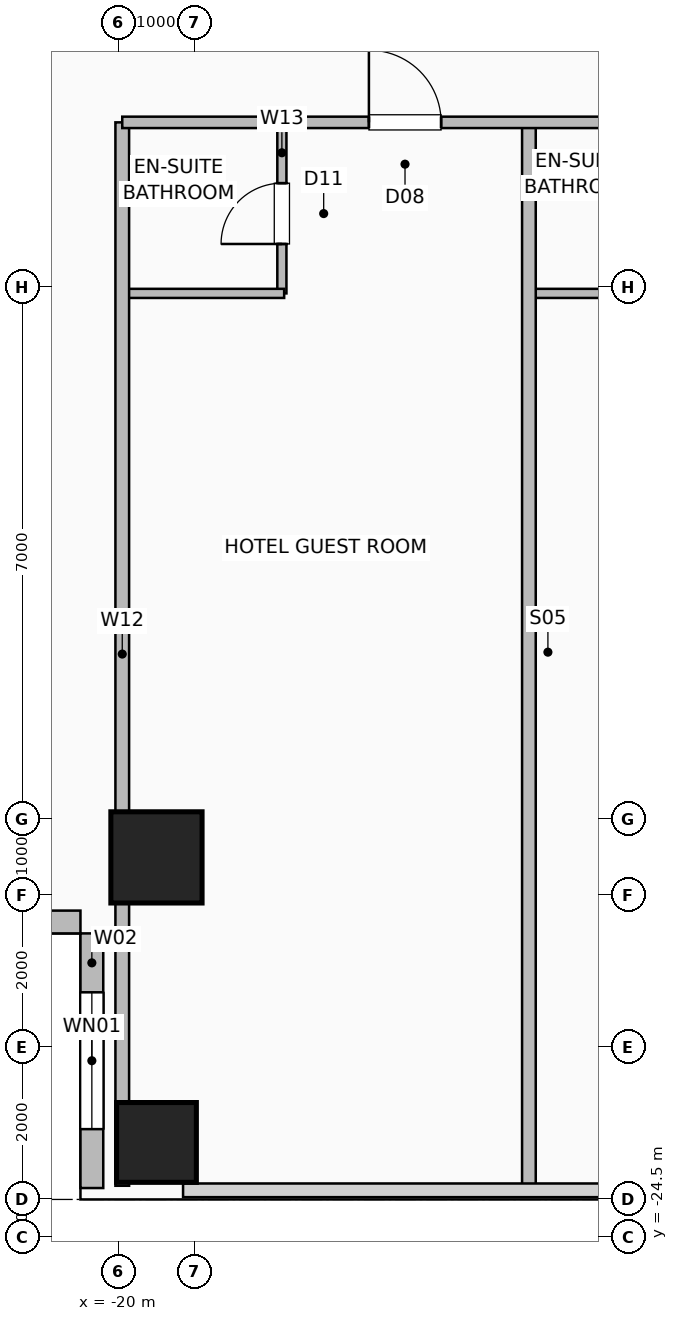
"""IFC4 building model, lengths in metres.
Left out: names, types, materials, properties, quantities, classifications, styles, units other than length and angle.
Written with IfcOpenShell. Run it as: python <this file> out.ifc"""

import sys

from ifc_helpers import new_model, si_unit, direction, frame, frame_2d, origin, origin_2d, place, context, subcontext, project, spatial, rectangle, hollow_rectangle, extrude, element, fill, save


model = new_model("IFC4")
c1 = context("Model", 3, precision=1e-05, world=origin(), true_north=direction((0.0, 1.0)))
c2 = subcontext(c1, "Body", "Model", "MODEL_VIEW")
j1 = project(units=[si_unit("LENGTHUNIT", "METRE"), si_unit("PLANEANGLEUNIT", "RADIAN")], contexts=[c1])
p1 = place(None, origin())
s1 = spatial("IfcSite", under=j1, at=p1, CompositionType="ELEMENT")
p2 = place(p1, origin())
s2 = spatial("IfcBuilding", under=s1, at=p2, CompositionType="ELEMENT")
p3 = place(p2, frame((0.0, 0.0, 62.0)))
s3 = spatial("IfcBuildingStorey", under=s2, at=p3, CompositionType="ELEMENT", Elevation=62.0)
p4 = place(p3, frame((-19.5, -23.25, 0.0), z_axis=(0.0, 0.0, 1.0), x_axis=(1.0, 0.0, 0.0)))
e1 = element("IfcColumn", 1, at=p4, inside=s3, PredefinedType="COLUMN", context=c2, shape_type="SweptSolid", body=[
    extrude(hollow_rectangle(XDim=1.05, YDim=1.05, WallThickness=0.05, at=origin_2d()), origin(), (0.0, 0.0, 1.0), 3.5),
])
p5 = place(p3, frame((-19.5, -19.5, 0.0), z_axis=(0.0, 0.0, 1.0), x_axis=(1.0, 0.0, 0.0)))
e2 = element("IfcColumn", 2, at=p5, inside=s3, PredefinedType="COLUMN", context=c2, shape_type="SweptSolid", body=[
    extrude(hollow_rectangle(XDim=1.2, YDim=1.2, WallThickness=0.055, at=origin_2d()), origin(), (0.0, 0.0, 1.0), 3.5),
])
p6 = place(p3, frame((-20.35, -23.85, 0.0), z_axis=(0.0, 0.0, 1.0), x_axis=(0.0, 1.0, 0.0)))
e3 = element("IfcWall", 3, at=p6, inside=s3, PredefinedType="SOLIDWALL", context=c2, shape_type="SweptSolid", body=[
    extrude(rectangle(XDim=3.35, YDim=0.3, at=frame_2d((1.675, 0.0))), origin(), (0.0, 0.0, 1.0), 3.25),
])
p7 = place(p6, frame((0.775, 0.0, 0.9)))
e4 = element("IfcOpeningElement", 4, at=p7, cuts=e3, PredefinedType="OPENING", context=c2, shape_type="SweptSolid", body=[
    extrude(rectangle(XDim=1.8, YDim=1.8, at=frame_2d((0.9, 0.9))), frame((0.0, 0.16, 0.0), z_axis=(0.0, -1.0, 0.0), x_axis=(1.0, 0.0, 0.0)), (0.0, 0.0, 1.0), 0.32),
])
p8 = place(p3, frame((-23.85, -20.35, 0.0), z_axis=(0.0, 0.0, 1.0), x_axis=(1.0, 0.0, 0.0)))
e5 = element("IfcWall", 5, at=p8, inside=s3, PredefinedType="SOLIDWALL", context=c2, shape_type="SweptSolid", body=[
    extrude(rectangle(XDim=3.35, YDim=0.3, at=frame_2d((1.675, 0.0))), origin(), (0.0, 0.0, 1.0), 3.25),
])
p9 = place(p3, frame((-17.85, -12.08, 0.0), z_axis=(0.0, 0.0, 1.0), x_axis=(0.0, 1.0, 0.0)))
e6 = element("IfcWall", 6, at=p9, inside=s3, PredefinedType="PLUMBINGWALL", context=c2, shape_type="SweptSolid", body=[
    extrude(rectangle(XDim=2.25, YDim=0.12, at=frame_2d((1.125, 0.0))), origin(), (0.0, 0.0, 1.0), 3.25),
])
p10 = place(p9, frame((0.65, 0.0, 0.0)))
e7 = element("IfcOpeningElement", 7, at=p10, cuts=e6, PredefinedType="OPENING", context=c2, shape_type="SweptSolid", body=[
    extrude(rectangle(XDim=0.8, YDim=2.05, at=frame_2d((0.4, 1.025))), frame((0.0, 0.07, 0.0), z_axis=(0.0, -1.0, 0.0), x_axis=(1.0, 0.0, 0.0)), (0.0, 0.0, 1.0), 0.14),
])
p11 = place(p3, frame((-19.92, -12.08, 0.0), z_axis=(0.0, 0.0, 1.0), x_axis=(1.0, 0.0, 0.0)))
e8 = element("IfcWall", 8, at=p11, inside=s3, PredefinedType="PLUMBINGWALL", context=c2, shape_type="SweptSolid", body=[
    extrude(rectangle(XDim=2.1, YDim=0.12, at=frame_2d((1.05, 0.0))), origin(), (0.0, 0.0, 1.0), 3.25),
])
p12 = place(p3, frame((-14.57, -12.08, 0.0), z_axis=(0.0, 0.0, 1.0), x_axis=(1.0, 0.0, 0.0)))
e9 = element("IfcWall", 9, at=p12, inside=s3, PredefinedType="PLUMBINGWALL", context=c2, shape_type="SweptSolid", body=[
    extrude(rectangle(XDim=1.913, YDim=0.12, at=frame_2d((0.957, 0.0))), origin(), (0.0, 0.0, 1.0), 3.25),
])
for number, where, z_axis, x_axis in (
    (10, (-19.95, -23.82, 0.0), (0.0, 0.0, 1.0), (0.0, 1.0, 0.0)),
    (11, (-14.6, -23.82, 0.0), (0.0, 0.0, 1.0), (0.0, 1.0, 0.0)),
):
    element("IfcWall", number, at=place(p3, frame(where, z_axis=z_axis, x_axis=x_axis)), inside=s3, PredefinedType="PARTITIONING", context=c2, shape_type="SweptSolid", body=[
        extrude(rectangle(XDim=13.99, YDim=0.18, at=frame_2d((6.995, 0.0))), origin(), (0.0, 0.0, 1.0), 3.25),
    ])
p13 = place(p3, frame((-19.95, -9.83, 0.0), z_axis=(0.0, 0.0, 1.0), x_axis=(1.0, 0.0, 0.0)))
e12 = element("IfcWall", 12, at=p13, inside=s3, PredefinedType="PARTITIONING", context=c2, shape_type="SweptSolid", body=[
    extrude(rectangle(XDim=39.9, YDim=0.15, at=frame_2d((19.95, 0.0))), origin(), (0.0, 0.0, 1.0), 3.25),
])
p14 = place(p13, frame((3.245, 0.0, 0.0)))
e13 = element("IfcOpeningElement", 13, at=p14, cuts=e12, PredefinedType="OPENING", context=c2, shape_type="SweptSolid", body=[
    extrude(rectangle(XDim=0.95, YDim=2.08, at=frame_2d((0.475, 1.04))), frame((0.0, 0.085, 0.0), z_axis=(0.0, -1.0, 0.0), x_axis=(1.0, 0.0, 0.0)), (0.0, 0.0, 1.0), 0.17),
])
p15 = place(p13, frame((8.227, 0.0, 0.0)))
e14 = element("IfcOpeningElement", 14, at=p15, cuts=e12, PredefinedType="OPENING", context=c2, shape_type="SweptSolid", body=[
    extrude(rectangle(XDim=0.95, YDim=2.08, at=frame_2d((0.475, 1.04))), frame((0.0, 0.085, 0.0), z_axis=(0.0, -1.0, 0.0), x_axis=(1.0, 0.0, 0.0)), (0.0, 0.0, 1.0), 0.17),
])
p16 = place(p13, frame((13.027, 0.0, 0.0)))
e15 = element("IfcOpeningElement", 15, at=p16, cuts=e12, PredefinedType="OPENING", context=c2, shape_type="SweptSolid", body=[
    extrude(rectangle(XDim=0.95, YDim=2.08, at=frame_2d((0.475, 1.04))), frame((0.0, 0.085, 0.0), z_axis=(0.0, -1.0, 0.0), x_axis=(1.0, 0.0, 0.0)), (0.0, 0.0, 1.0), 0.17),
])
p17 = place(p13, frame((16.861, 0.0, 0.0)))
e16 = element("IfcOpeningElement", 16, at=p17, cuts=e12, PredefinedType="OPENING", context=c2, shape_type="SweptSolid", body=[
    extrude(rectangle(XDim=0.95, YDim=2.08, at=frame_2d((0.475, 1.04))), frame((0.0, 0.085, 0.0), z_axis=(0.0, -1.0, 0.0), x_axis=(1.0, 0.0, 0.0)), (0.0, 0.0, 1.0), 0.17),
])
p18 = place(p13, frame((22.02, 0.0, 0.0)))
e17 = element("IfcOpeningElement", 17, at=p18, cuts=e12, PredefinedType="OPENING", context=c2, shape_type="SweptSolid", body=[
    extrude(rectangle(XDim=0.95, YDim=2.08, at=frame_2d((0.475, 1.04))), frame((0.0, 0.085, 0.0), z_axis=(0.0, -1.0, 0.0), x_axis=(1.0, 0.0, 0.0)), (0.0, 0.0, 1.0), 0.17),
])
p19 = place(p13, frame((27.427, 0.0, 0.0)))
e18 = element("IfcOpeningElement", 18, at=p19, cuts=e12, PredefinedType="OPENING", context=c2, shape_type="SweptSolid", body=[
    extrude(rectangle(XDim=0.95, YDim=2.08, at=frame_2d((0.475, 1.04))), frame((0.0, 0.085, 0.0), z_axis=(0.0, -1.0, 0.0), x_axis=(1.0, 0.0, 0.0)), (0.0, 0.0, 1.0), 0.17),
])
p20 = place(p13, frame((32.365, 0.0, 0.0)))
e19 = element("IfcOpeningElement", 19, at=p20, cuts=e12, PredefinedType="OPENING", context=c2, shape_type="SweptSolid", body=[
    extrude(rectangle(XDim=0.95, YDim=2.08, at=frame_2d((0.475, 1.04))), frame((0.0, 0.085, 0.0), z_axis=(0.0, -1.0, 0.0), x_axis=(1.0, 0.0, 0.0)), (0.0, 0.0, 1.0), 0.17),
])
p21 = place(p13, frame((37.695, 0.0, 0.0)))
e20 = element("IfcOpeningElement", 20, at=p21, cuts=e12, PredefinedType="OPENING", context=c2, shape_type="SweptSolid", body=[
    extrude(rectangle(XDim=0.95, YDim=2.08, at=frame_2d((0.475, 1.04))), frame((0.0, 0.085, 0.0), z_axis=(0.0, -1.0, 0.0), x_axis=(1.0, 0.0, 0.0)), (0.0, 0.0, 1.0), 0.17),
])
p22 = place(p7, origin())
e21 = element("IfcWindow", 21, at=p22, inside=s3, PartitioningType="SINGLE_PANEL", PredefinedType="WINDOW", context=c2, shape_type="SweptSolid", body=[
    extrude(rectangle(XDim=1.8, YDim=1.8, at=frame_2d((0.9, 0.9))), frame((0.0, 0.03, 0.0), z_axis=(0.0, -1.0, 0.0), x_axis=(1.0, 0.0, 0.0)), (0.0, 0.0, 1.0), 0.06),
])
fill(e4, e21)
p23 = place(p10, origin())
e22 = element("IfcDoor", 22, at=p23, inside=s3, OperationType="SINGLE_SWING_LEFT", PredefinedType="DOOR", context=c2, shape_type="SweptSolid", body=[
    extrude(rectangle(XDim=0.8, YDim=2.05, at=frame_2d((0.4, 1.025))), frame((0.0, 0.025, 0.0), z_axis=(0.0, -1.0, 0.0), x_axis=(1.0, 0.0, 0.0)), (0.0, 0.0, 1.0), 0.05),
])
fill(e7, e22)
p24 = place(p14, origin())
e23 = element("IfcDoor", 23, at=p24, inside=s3, OperationType="SINGLE_SWING_LEFT", PredefinedType="DOOR", context=c2, shape_type="SweptSolid", body=[
    extrude(rectangle(XDim=0.95, YDim=2.08, at=frame_2d((0.475, 1.04))), frame((0.0, 0.025, 0.0), z_axis=(0.0, -1.0, 0.0), x_axis=(1.0, 0.0, 0.0)), (0.0, 0.0, 1.0), 0.05),
])
fill(e13, e23)
save(model, sys.argv[1])
